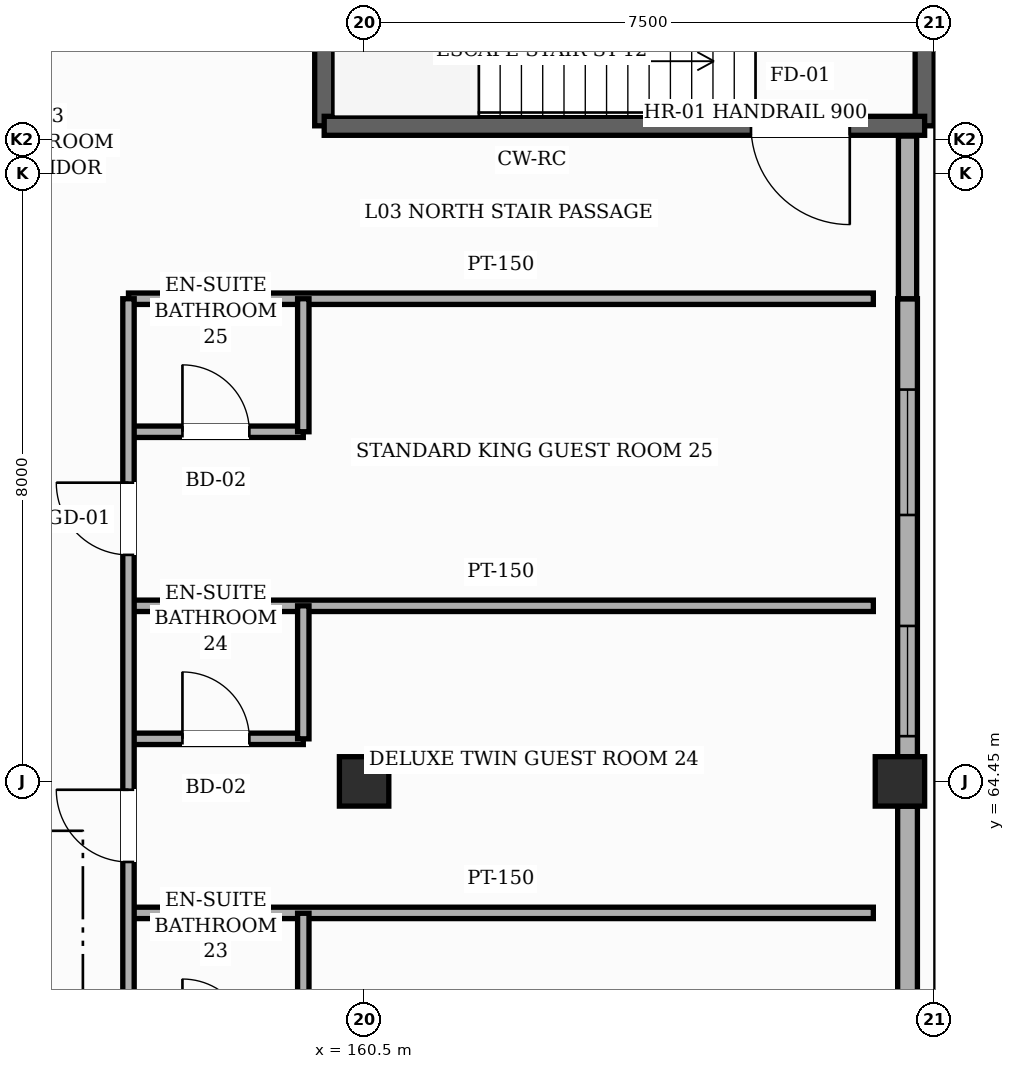
"""IFC4 building model, lengths in metres.
Left out: names, types, materials, properties, quantities, classifications, styles, units other than length and angle.
Written with IfcOpenShell. Run it as: python <this file> out.ifc"""

import sys

from ifc_helpers import new_model, si_unit, direction, frame, frame_2d, origin, origin_2d, place, context, subcontext, project, spatial, rectangle, hollow_rectangle, extrude, element, fill, save


model = new_model("IFC4")
c1 = context("Model", 3, precision=1e-05, world=origin(), true_north=direction((0.0, 1.0)))
c2 = subcontext(c1, "Body", "Model", "MODEL_VIEW")
j1 = project(units=[si_unit("LENGTHUNIT", "METRE"), si_unit("PLANEANGLEUNIT", "RADIAN")], contexts=[c1])
p1 = place(None, origin())
s1 = spatial("IfcSite", under=j1, at=p1, CompositionType="ELEMENT")
p2 = place(p1, origin())
s2 = spatial("IfcBuilding", under=s1, at=p2, CompositionType="ELEMENT")
p3 = place(p2, frame((0.0, 0.0, 15.0)))
s3 = spatial("IfcBuildingStorey", under=s2, at=p3, CompositionType="ELEMENT", Elevation=15.0)
for number, where, z_axis, x_axis in (
    (1, (160.5, 64.45, 0.0), (0.0, 0.0, 1.0), (1.0, 0.0, 0.0)),
    (2, (167.55, 64.45, 0.0), (0.0, 0.0, 1.0), (1.0, 0.0, 0.0)),
):
    element("IfcColumn", number, at=place(p3, frame(where, z_axis=z_axis, x_axis=x_axis)), inside=s3, PredefinedType="COLUMN", context=c2, shape_type="SweptSolid", body=[
        extrude(hollow_rectangle(XDim=0.65, YDim=0.65, WallThickness=0.025, InnerFilletRadius=0.025, OuterFilletRadius=0.05, at=origin_2d()), origin(), (0.0, 0.0, 1.0), 4.8),
    ])
p4 = place(p3, frame((167.65, 64.125, 0.0), z_axis=(0.0, 0.0, 1.0), x_axis=(0.0, -1.0, 0.0)))
e3 = element("IfcWall", 3, at=p4, inside=s3, PredefinedType="SOLIDWALL", context=c2, shape_type="SweptSolid", body=[
    extrude(rectangle(XDim=7.35, YDim=0.26, at=frame_2d((3.675, 0.0))), origin(), (0.0, 0.0, 1.0), 3.885),
])
p5 = place(p4, frame((5.975, 0.0, 0.85)))
e4 = element("IfcOpeningElement", 4, at=p5, cuts=e3, PredefinedType="OPENING", context=c2, shape_type="SweptSolid", body=[
    extrude(rectangle(XDim=0.85, YDim=1.35, at=frame_2d((0.425, 0.675))), frame((0.0, 0.14, 0.0), z_axis=(0.0, -1.0, 0.0), x_axis=(1.0, 0.0, 0.0)), (0.0, 0.0, 1.0), 0.28),
])
p6 = place(p4, frame((2.805, 0.0, 0.85)))
e5 = element("IfcOpeningElement", 5, at=p6, cuts=e3, PredefinedType="OPENING", context=c2, shape_type="SweptSolid", body=[
    extrude(rectangle(XDim=1.25, YDim=1.5, at=frame_2d((0.625, 0.75))), frame((0.0, 0.14, 0.0), z_axis=(0.0, -1.0, 0.0), x_axis=(1.0, 0.0, 0.0)), (0.0, 0.0, 1.0), 0.28),
])
p7 = place(p3, frame((167.65, 70.8, 0.0), z_axis=(0.0, 0.0, 1.0), x_axis=(0.0, -1.0, 0.0)))
e6 = element("IfcWall", 6, at=p7, inside=s3, PredefinedType="SOLIDWALL", context=c2, shape_type="SweptSolid", body=[
    extrude(rectangle(XDim=6.025, YDim=0.26, at=frame_2d((3.013, 0.0))), origin(), (0.0, 0.0, 1.0), 4.545),
])
p8 = place(p7, frame((4.305, 0.0, 0.85)))
e7 = element("IfcOpeningElement", 7, at=p8, cuts=e6, PredefinedType="OPENING", context=c2, shape_type="SweptSolid", body=[
    extrude(rectangle(XDim=1.45, YDim=1.5, at=frame_2d((0.725, 0.75))), frame((0.0, 0.14, 0.0), z_axis=(0.0, -1.0, 0.0), x_axis=(1.0, 0.0, 0.0)), (0.0, 0.0, 1.0), 0.28),
])
p9 = place(p7, frame((1.195, 0.0, 0.85)))
e8 = element("IfcOpeningElement", 8, at=p9, cuts=e6, PredefinedType="OPENING", context=c2, shape_type="SweptSolid", body=[
    extrude(rectangle(XDim=1.65, YDim=1.5, at=frame_2d((0.825, 0.75))), frame((0.0, 0.14, 0.0), z_axis=(0.0, -1.0, 0.0), x_axis=(1.0, 0.0, 0.0)), (0.0, 0.0, 1.0), 0.28),
])
p10 = place(p3, frame((167.65, 72.94, 0.0), z_axis=(0.0, 0.0, 1.0), x_axis=(0.0, -1.0, 0.0)))
e9 = element("IfcWall", 9, at=p10, inside=s3, PredefinedType="SOLIDWALL", context=c2, shape_type="SweptSolid", body=[
    extrude(rectangle(XDim=2.14, YDim=0.24, at=frame_2d((1.07, 0.0))), origin(), (0.0, 0.0, 1.0), 4.545),
])
for number, where, z_axis, x_axis in (
    (10, (167.875, 76.425, 0.0), (0.0, 0.0, 1.0), (0.0, -1.0, 0.0)),
    (11, (159.975, 73.075, 0.0), (0.0, 0.0, 1.0), (0.0, 1.0, 0.0)),
):
    element("IfcWall", number, at=place(p3, frame(where, z_axis=z_axis, x_axis=x_axis)), inside=s3, PredefinedType="SHEAR", context=c2, shape_type="SweptSolid", body=[
        extrude(rectangle(XDim=3.35, YDim=0.25, at=frame_2d((1.675, 0.0))), origin(), (0.0, 0.0, 1.0), 4.56),
    ])
p11 = place(p3, frame((167.875, 73.075, 0.0), z_axis=(0.0, 0.0, 1.0), x_axis=(-1.0, 0.0, 0.0)))
e12 = element("IfcWall", 12, at=p11, inside=s3, PredefinedType="SHEAR", context=c2, shape_type="SweptSolid", body=[
    extrude(rectangle(XDim=7.9, YDim=0.25, at=frame_2d((3.95, 0.0))), origin(), (0.0, 0.0, 1.0), 4.56),
])
p12 = place(p11, frame((0.985, 0.0, 0.0)))
e13 = element("IfcOpeningElement", 13, at=p12, cuts=e12, PredefinedType="OPENING", context=c2, shape_type="SweptSolid", body=[
    extrude(rectangle(XDim=1.3, YDim=2.2, at=frame_2d((0.65, 1.1))), frame((0.0, 0.135, 0.0), z_axis=(0.0, -1.0, 0.0), x_axis=(1.0, 0.0, 0.0)), (0.0, 0.0, 1.0), 0.27),
])
p13 = place(p3, frame((157.4, 62.72, 0.0), z_axis=(0.0, 0.0, 1.0), x_axis=(1.0, 0.0, 0.0)))
e14 = element("IfcWall", 14, at=p13, inside=s3, PredefinedType="PARTITIONING", context=c2, shape_type="SweptSolid", body=[
    extrude(rectangle(XDim=9.8, YDim=0.15, at=frame_2d((4.9, 0.0))), origin(), (0.0, 0.0, 1.0), 4.545),
])
p14 = place(p3, frame((157.4, 65.01, 0.0), z_axis=(0.0, 0.0, 1.0), x_axis=(1.0, 0.0, 0.0)))
e15 = element("IfcWall", 15, at=p14, inside=s3, PredefinedType="PARTITIONING", context=c2, shape_type="SweptSolid", body=[
    extrude(rectangle(XDim=2.3, YDim=0.15, at=frame_2d((1.15, 0.0))), origin(), (0.0, 0.0, 1.0), 4.545),
])
p15 = place(p14, frame((0.71, 0.0, 0.0)))
e16 = element("IfcOpeningElement", 16, at=p15, cuts=e15, PredefinedType="OPENING", context=c2, shape_type="SweptSolid", body=[
    extrude(rectangle(XDim=0.88, YDim=2.12, at=frame_2d((0.44, 1.06))), frame((0.0, 0.085, 0.0), z_axis=(0.0, -1.0, 0.0), x_axis=(1.0, 0.0, 0.0)), (0.0, 0.0, 1.0), 0.17),
])
p16 = place(p3, frame((157.4, 66.76, 0.0), z_axis=(0.0, 0.0, 1.0), x_axis=(1.0, 0.0, 0.0)))
e17 = element("IfcWall", 17, at=p16, inside=s3, PredefinedType="PARTITIONING", context=c2, shape_type="SweptSolid", body=[
    extrude(rectangle(XDim=9.8, YDim=0.15, at=frame_2d((4.9, 0.0))), origin(), (0.0, 0.0, 1.0), 4.545),
])
p17 = place(p3, frame((157.4, 69.05, 0.0), z_axis=(0.0, 0.0, 1.0), x_axis=(1.0, 0.0, 0.0)))
e18 = element("IfcWall", 18, at=p17, inside=s3, PredefinedType="PARTITIONING", context=c2, shape_type="SweptSolid", body=[
    extrude(rectangle(XDim=2.3, YDim=0.15, at=frame_2d((1.15, 0.0))), origin(), (0.0, 0.0, 1.0), 4.545),
])
p18 = place(p17, frame((0.71, 0.0, 0.0)))
e19 = element("IfcOpeningElement", 19, at=p18, cuts=e18, PredefinedType="OPENING", context=c2, shape_type="SweptSolid", body=[
    extrude(rectangle(XDim=0.88, YDim=2.12, at=frame_2d((0.44, 1.06))), frame((0.0, 0.085, 0.0), z_axis=(0.0, -1.0, 0.0), x_axis=(1.0, 0.0, 0.0)), (0.0, 0.0, 1.0), 0.17),
])
p19 = place(p3, frame((157.4, 70.8, 0.0), z_axis=(0.0, 0.0, 1.0), x_axis=(1.0, 0.0, 0.0)))
e20 = element("IfcWall", 20, at=p19, inside=s3, PredefinedType="PARTITIONING", context=c2, shape_type="SweptSolid", body=[
    extrude(rectangle(XDim=9.8, YDim=0.15, at=frame_2d((4.9, 0.0))), origin(), (0.0, 0.0, 1.0), 4.545),
])
p20 = place(p3, frame((157.4, 22.3, 0.0), z_axis=(0.0, 0.0, 1.0), x_axis=(0.0, 1.0, 0.0)))
e21 = element("IfcWall", 21, at=p20, inside=s3, PredefinedType="PARTITIONING", context=c2, shape_type="SweptSolid", body=[
    extrude(rectangle(XDim=48.5, YDim=0.15, at=frame_2d((24.25, 0.0))), origin(), (0.0, 0.0, 1.0), 4.545),
])
p21 = place(p20, frame((0.67, 0.0, 0.0)))
e22 = element("IfcOpeningElement", 22, at=p21, cuts=e21, PredefinedType="OPENING", context=c2, shape_type="SweptSolid", body=[
    extrude(rectangle(XDim=0.95, YDim=2.15, at=frame_2d((0.475, 1.075))), frame((0.0, 0.085, 0.0), z_axis=(0.0, -1.0, 0.0), x_axis=(1.0, 0.0, 0.0)), (0.0, 0.0, 1.0), 0.17),
])
p22 = place(p20, frame((4.71, 0.0, 0.0)))
e23 = element("IfcOpeningElement", 23, at=p22, cuts=e21, PredefinedType="OPENING", context=c2, shape_type="SweptSolid", body=[
    extrude(rectangle(XDim=0.95, YDim=2.15, at=frame_2d((0.475, 1.075))), frame((0.0, 0.085, 0.0), z_axis=(0.0, -1.0, 0.0), x_axis=(1.0, 0.0, 0.0)), (0.0, 0.0, 1.0), 0.17),
])
p23 = place(p20, frame((8.755, 0.0, 0.0)))
e24 = element("IfcOpeningElement", 24, at=p23, cuts=e21, PredefinedType="OPENING", context=c2, shape_type="SweptSolid", body=[
    extrude(rectangle(XDim=0.95, YDim=2.15, at=frame_2d((0.475, 1.075))), frame((0.0, 0.085, 0.0), z_axis=(0.0, -1.0, 0.0), x_axis=(1.0, 0.0, 0.0)), (0.0, 0.0, 1.0), 0.17),
])
p24 = place(p20, frame((12.795, 0.0, 0.0)))
e25 = element("IfcOpeningElement", 25, at=p24, cuts=e21, PredefinedType="OPENING", context=c2, shape_type="SweptSolid", body=[
    extrude(rectangle(XDim=0.95, YDim=2.15, at=frame_2d((0.475, 1.075))), frame((0.0, 0.085, 0.0), z_axis=(0.0, -1.0, 0.0), x_axis=(1.0, 0.0, 0.0)), (0.0, 0.0, 1.0), 0.17),
])
p25 = place(p20, frame((16.835, 0.0, 0.0)))
e26 = element("IfcOpeningElement", 26, at=p25, cuts=e21, PredefinedType="OPENING", context=c2, shape_type="SweptSolid", body=[
    extrude(rectangle(XDim=0.95, YDim=2.15, at=frame_2d((0.475, 1.075))), frame((0.0, 0.085, 0.0), z_axis=(0.0, -1.0, 0.0), x_axis=(1.0, 0.0, 0.0)), (0.0, 0.0, 1.0), 0.17),
])
p26 = place(p20, frame((20.88, 0.0, 0.0)))
e27 = element("IfcOpeningElement", 27, at=p26, cuts=e21, PredefinedType="OPENING", context=c2, shape_type="SweptSolid", body=[
    extrude(rectangle(XDim=0.95, YDim=2.15, at=frame_2d((0.475, 1.075))), frame((0.0, 0.085, 0.0), z_axis=(0.0, -1.0, 0.0), x_axis=(1.0, 0.0, 0.0)), (0.0, 0.0, 1.0), 0.17),
])
p27 = place(p20, frame((24.92, 0.0, 0.0)))
e28 = element("IfcOpeningElement", 28, at=p27, cuts=e21, PredefinedType="OPENING", context=c2, shape_type="SweptSolid", body=[
    extrude(rectangle(XDim=0.95, YDim=2.15, at=frame_2d((0.475, 1.075))), frame((0.0, 0.085, 0.0), z_axis=(0.0, -1.0, 0.0), x_axis=(1.0, 0.0, 0.0)), (0.0, 0.0, 1.0), 0.17),
])
p28 = place(p20, frame((28.96, 0.0, 0.0)))
e29 = element("IfcOpeningElement", 29, at=p28, cuts=e21, PredefinedType="OPENING", context=c2, shape_type="SweptSolid", body=[
    extrude(rectangle(XDim=0.95, YDim=2.15, at=frame_2d((0.475, 1.075))), frame((0.0, 0.085, 0.0), z_axis=(0.0, -1.0, 0.0), x_axis=(1.0, 0.0, 0.0)), (0.0, 0.0, 1.0), 0.17),
])
p29 = place(p20, frame((33.005, 0.0, 0.0)))
e30 = element("IfcOpeningElement", 30, at=p29, cuts=e21, PredefinedType="OPENING", context=c2, shape_type="SweptSolid", body=[
    extrude(rectangle(XDim=0.95, YDim=2.15, at=frame_2d((0.475, 1.075))), frame((0.0, 0.085, 0.0), z_axis=(0.0, -1.0, 0.0), x_axis=(1.0, 0.0, 0.0)), (0.0, 0.0, 1.0), 0.17),
])
p30 = place(p20, frame((37.045, 0.0, 0.0)))
e31 = element("IfcOpeningElement", 31, at=p30, cuts=e21, PredefinedType="OPENING", context=c2, shape_type="SweptSolid", body=[
    extrude(rectangle(XDim=0.95, YDim=2.15, at=frame_2d((0.475, 1.075))), frame((0.0, 0.085, 0.0), z_axis=(0.0, -1.0, 0.0), x_axis=(1.0, 0.0, 0.0)), (0.0, 0.0, 1.0), 0.17),
])
p31 = place(p20, frame((41.09, 0.0, 0.0)))
e32 = element("IfcOpeningElement", 32, at=p31, cuts=e21, PredefinedType="OPENING", context=c2, shape_type="SweptSolid", body=[
    extrude(rectangle(XDim=0.95, YDim=2.15, at=frame_2d((0.475, 1.075))), frame((0.0, 0.085, 0.0), z_axis=(0.0, -1.0, 0.0), x_axis=(1.0, 0.0, 0.0)), (0.0, 0.0, 1.0), 0.17),
])
p32 = place(p20, frame((45.13, 0.0, 0.0)))
e33 = element("IfcOpeningElement", 33, at=p32, cuts=e21, PredefinedType="OPENING", context=c2, shape_type="SweptSolid", body=[
    extrude(rectangle(XDim=0.95, YDim=2.15, at=frame_2d((0.475, 1.075))), frame((0.0, 0.085, 0.0), z_axis=(0.0, -1.0, 0.0), x_axis=(1.0, 0.0, 0.0)), (0.0, 0.0, 1.0), 0.17),
])
for number, where, z_axis, x_axis in (
    (34, (159.7, 60.965, 0.0), (0.0, 0.0, 1.0), (0.0, 1.0, 0.0)),
    (35, (159.7, 65.01, 0.0), (0.0, 0.0, 1.0), (0.0, 1.0, 0.0)),
    (36, (159.7, 69.05, 0.0), (0.0, 0.0, 1.0), (0.0, 1.0, 0.0)),
):
    element("IfcWall", number, at=place(p3, frame(where, z_axis=z_axis, x_axis=x_axis)), inside=s3, PredefinedType="PARTITIONING", context=c2, shape_type="SweptSolid", body=[
        extrude(rectangle(XDim=1.75, YDim=0.15, at=frame_2d((0.875, 0.0))), origin(), (0.0, 0.0, 1.0), 4.545),
    ])
p33 = place(p8, origin())
e37 = element("IfcWindow", 37, at=p33, inside=s3, PartitioningType="SINGLE_PANEL", PredefinedType="WINDOW", context=c2, shape_type="SweptSolid", body=[
    extrude(rectangle(XDim=1.45, YDim=1.5, at=frame_2d((0.725, 0.75))), frame((0.0, 0.03, 0.0), z_axis=(0.0, -1.0, 0.0), x_axis=(1.0, 0.0, 0.0)), (0.0, 0.0, 1.0), 0.06),
])
fill(e7, e37)
p34 = place(p9, origin())
e38 = element("IfcWindow", 38, at=p34, inside=s3, PartitioningType="SINGLE_PANEL", PredefinedType="WINDOW", context=c2, shape_type="SweptSolid", body=[
    extrude(rectangle(XDim=1.65, YDim=1.5, at=frame_2d((0.825, 0.75))), frame((0.0, 0.03, 0.0), z_axis=(0.0, -1.0, 0.0), x_axis=(1.0, 0.0, 0.0)), (0.0, 0.0, 1.0), 0.06),
])
fill(e8, e38)
p35 = place(p12, origin())
e39 = element("IfcDoor", 39, at=p35, inside=s3, OperationType="SINGLE_SWING_LEFT", PredefinedType="DOOR", context=c2, shape_type="SweptSolid", body=[
    extrude(rectangle(XDim=1.3, YDim=2.2, at=frame_2d((0.65, 1.1))), frame((0.0, 0.025, 0.0), z_axis=(0.0, -1.0, 0.0), x_axis=(1.0, 0.0, 0.0)), (0.0, 0.0, 1.0), 0.05),
])
fill(e13, e39)
p36 = place(p31, origin())
e40 = element("IfcDoor", 40, at=p36, inside=s3, OperationType="SINGLE_SWING_RIGHT", PredefinedType="DOOR", context=c2, shape_type="SweptSolid", body=[
    extrude(rectangle(XDim=0.95, YDim=2.15, at=frame_2d((0.475, 1.075))), frame((0.0, 0.025, 0.0), z_axis=(0.0, -1.0, 0.0), x_axis=(1.0, 0.0, 0.0)), (0.0, 0.0, 1.0), 0.05),
])
fill(e32, e40)
p37 = place(p15, origin())
e41 = element("IfcDoor", 41, at=p37, inside=s3, OperationType="SINGLE_SWING_LEFT", PredefinedType="DOOR", context=c2, shape_type="SweptSolid", body=[
    extrude(rectangle(XDim=0.88, YDim=2.12, at=frame_2d((0.44, 1.06))), frame((0.0, 0.025, 0.0), z_axis=(0.0, -1.0, 0.0), x_axis=(1.0, 0.0, 0.0)), (0.0, 0.0, 1.0), 0.05),
])
fill(e16, e41)
p38 = place(p32, origin())
e42 = element("IfcDoor", 42, at=p38, inside=s3, OperationType="SINGLE_SWING_RIGHT", PredefinedType="DOOR", context=c2, shape_type="SweptSolid", body=[
    extrude(rectangle(XDim=0.95, YDim=2.15, at=frame_2d((0.475, 1.075))), frame((0.0, 0.025, 0.0), z_axis=(0.0, -1.0, 0.0), x_axis=(1.0, 0.0, 0.0)), (0.0, 0.0, 1.0), 0.05),
])
fill(e33, e42)
p39 = place(p18, origin())
e43 = element("IfcDoor", 43, at=p39, inside=s3, OperationType="SINGLE_SWING_LEFT", PredefinedType="DOOR", context=c2, shape_type="SweptSolid", body=[
    extrude(rectangle(XDim=0.88, YDim=2.12, at=frame_2d((0.44, 1.06))), frame((0.0, 0.025, 0.0), z_axis=(0.0, -1.0, 0.0), x_axis=(1.0, 0.0, 0.0)), (0.0, 0.0, 1.0), 0.05),
])
fill(e19, e43)
save(model, sys.argv[1])
